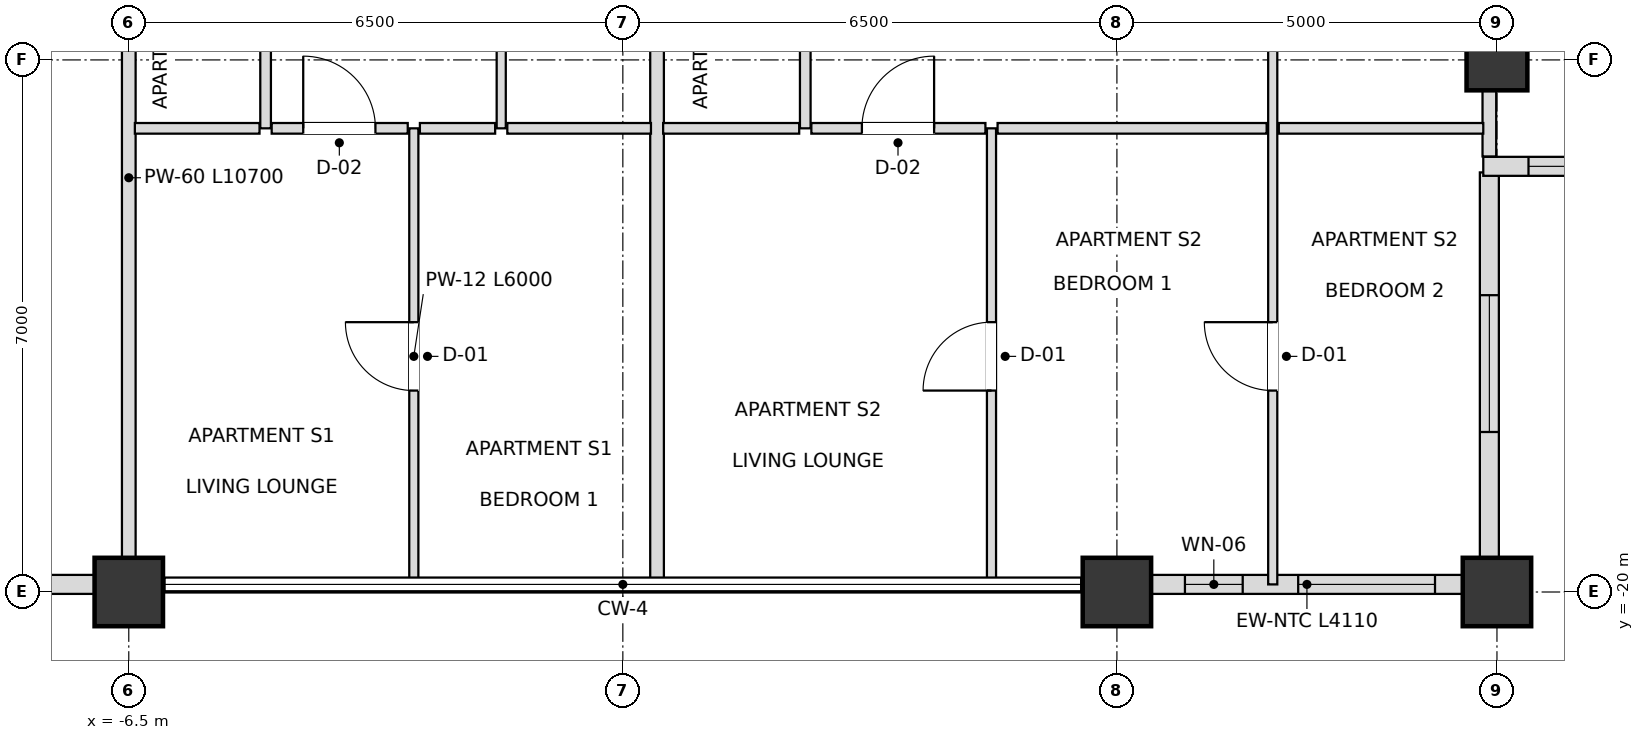
"""IFC4 building model, lengths in metres.
Left out: names, types, materials, properties, quantities, classifications, styles, units other than length and angle.
Written with IfcOpenShell. Run it as: python <this file> out.ifc"""

import sys

from ifc_helpers import new_model, si_unit, direction, frame, frame_2d, origin, origin_2d, place, context, subcontext, project, spatial, rectangle, extrude, element, fill, save


model = new_model("IFC4")
c1 = context("Model", 3, precision=1e-05, world=origin(), true_north=direction((0.0, 1.0)))
c2 = subcontext(c1, "Body", "Model", "MODEL_VIEW")
j1 = project(units=[si_unit("LENGTHUNIT", "METRE"), si_unit("PLANEANGLEUNIT", "RADIAN")], contexts=[c1])
p1 = place(None, origin())
s1 = spatial("IfcSite", under=j1, at=p1, CompositionType="ELEMENT")
p2 = place(p1, origin())
s2 = spatial("IfcBuilding", under=s1, at=p2, CompositionType="ELEMENT")
p3 = place(p2, frame((0.0, 0.0, 225.9)))
s3 = spatial("IfcBuildingStorey", under=s2, at=p3, CompositionType="ELEMENT", Elevation=225.9)
for number, where, z_axis, x_axis in (
    (1, (-6.5, -20.0, 0.0), (0.0, 0.0, 1.0), (1.0, 0.0, 0.0)),
    (2, (6.5, -20.0, 0.0), (0.0, 0.0, 1.0), (1.0, 0.0, 0.0)),
    (3, (11.5, -20.0, 0.0), (0.0, 0.0, 1.0), (1.0, 0.0, 0.0)),
):
    element("IfcColumn", number, at=place(p3, frame(where, z_axis=z_axis, x_axis=x_axis)), inside=s3, PredefinedType="USERDEFINED", context=c2, shape_type="SweptSolid", body=[
        extrude(rectangle(XDim=0.9, YDim=0.9, at=origin_2d()), origin(), (0.0, 0.0, 1.0), 3.6),
    ])
p4 = place(p3, frame((11.5, -13.0, 0.0), z_axis=(0.0, 0.0, 1.0), x_axis=(1.0, 0.0, 0.0)))
e4 = element("IfcColumn", 4, at=p4, inside=s3, PredefinedType="COLUMN", context=c2, shape_type="SweptSolid", body=[
    extrude(rectangle(XDim=0.8, YDim=0.8, at=origin_2d()), origin(), (0.0, 0.0, 1.0), 3.6),
])
p5 = place(p3, frame((-11.055, -19.9, 0.0), z_axis=(0.0, 0.0, 1.0), x_axis=(1.0, 0.0, 0.0)))
e5 = element("IfcWall", 5, at=p5, inside=s3, PredefinedType="SOLIDWALL", context=c2, shape_type="SweptSolid", body=[
    extrude(rectangle(XDim=4.11, YDim=0.25, at=frame_2d((2.055, 0.0))), origin(), (0.0, 0.0, 1.0), 2.748),
])
p6 = place(p5, frame((1.155, 0.0, 0.72)))
e6 = element("IfcOpeningElement", 6, at=p6, cuts=e5, PredefinedType="OPENING", context=c2, shape_type="SweptSolid", body=[
    extrude(rectangle(XDim=1.8, YDim=1.68, at=frame_2d((0.9, 0.84))), frame((0.0, 0.135, 0.0), z_axis=(0.0, -1.0, 0.0), x_axis=(1.0, 0.0, 0.0)), (0.0, 0.0, 1.0), 0.27),
])
p7 = place(p3, frame((6.945, -19.9, 0.0), z_axis=(0.0, 0.0, 1.0), x_axis=(1.0, 0.0, 0.0)))
e7 = element("IfcWall", 7, at=p7, inside=s3, PredefinedType="SOLIDWALL", context=c2, shape_type="SweptSolid", body=[
    extrude(rectangle(XDim=4.11, YDim=0.25, at=frame_2d((2.055, 0.0))), origin(), (0.0, 0.0, 1.0), 2.748),
])
p8 = place(p7, frame((0.45, 0.0, 0.72)))
e8 = element("IfcOpeningElement", 8, at=p8, cuts=e7, PredefinedType="OPENING", context=c2, shape_type="SweptSolid", body=[
    extrude(rectangle(XDim=0.76, YDim=1.68, at=frame_2d((0.38, 0.84))), frame((0.0, 0.135, 0.0), z_axis=(0.0, -1.0, 0.0), x_axis=(1.0, 0.0, 0.0)), (0.0, 0.0, 1.0), 0.27),
])
p9 = place(p7, frame((1.94, 0.0, 0.72)))
e9 = element("IfcOpeningElement", 9, at=p9, cuts=e7, PredefinedType="OPENING", context=c2, shape_type="SweptSolid", body=[
    extrude(rectangle(XDim=1.8, YDim=1.68, at=frame_2d((0.9, 0.84))), frame((0.0, 0.135, 0.0), z_axis=(0.0, -1.0, 0.0), x_axis=(1.0, 0.0, 0.0)), (0.0, 0.0, 1.0), 0.27),
])
p10 = place(p3, frame((11.4, -19.82, 0.0), z_axis=(0.0, 0.0, 1.0), x_axis=(0.0, 1.0, 0.0)))
e10 = element("IfcWall", 10, at=p10, inside=s3, PredefinedType="SOLIDWALL", context=c2, shape_type="SweptSolid", body=[
    extrude(rectangle(XDim=5.34, YDim=0.25, at=frame_2d((2.67, 0.0))), origin(), (0.0, 0.0, 1.0), 2.748),
])
p11 = place(p10, frame((1.925, 0.0, 0.72)))
e11 = element("IfcOpeningElement", 11, at=p11, cuts=e10, PredefinedType="OPENING", context=c2, shape_type="SweptSolid", body=[
    extrude(rectangle(XDim=1.8, YDim=1.68, at=frame_2d((0.9, 0.84))), frame((0.0, 0.135, 0.0), z_axis=(0.0, -1.0, 0.0), x_axis=(1.0, 0.0, 0.0)), (0.0, 0.0, 1.0), 0.27),
])
p12 = place(p3, frame((11.32, -14.4, 0.0), z_axis=(0.0, 0.0, 1.0), x_axis=(1.0, 0.0, 0.0)))
e12 = element("IfcWall", 12, at=p12, inside=s3, PredefinedType="SOLIDWALL", context=c2, shape_type="SweptSolid", body=[
    extrude(rectangle(XDim=5.66, YDim=0.25, at=frame_2d((2.83, 0.0))), origin(), (0.0, 0.0, 1.0), 2.748),
])
p13 = place(p12, frame((0.595, 0.0, 0.72)))
e13 = element("IfcOpeningElement", 13, at=p13, cuts=e12, PredefinedType="OPENING", context=c2, shape_type="SweptSolid", body=[
    extrude(rectangle(XDim=1.8, YDim=1.68, at=frame_2d((0.9, 0.84))), frame((0.0, 0.135, 0.0), z_axis=(0.0, -1.0, 0.0), x_axis=(1.0, 0.0, 0.0)), (0.0, 0.0, 1.0), 0.27),
])
p14 = place(p12, frame((3.265, 0.0, 0.72)))
e14 = element("IfcOpeningElement", 14, at=p14, cuts=e12, PredefinedType="OPENING", context=c2, shape_type="SweptSolid", body=[
    extrude(rectangle(XDim=1.8, YDim=1.68, at=frame_2d((0.9, 0.84))), frame((0.0, 0.135, 0.0), z_axis=(0.0, -1.0, 0.0), x_axis=(1.0, 0.0, 0.0)), (0.0, 0.0, 1.0), 0.27),
])
p15 = place(p3, frame((-6.5, -19.9, 0.0), z_axis=(0.0, 0.0, 1.0), x_axis=(0.0, 1.0, 0.0)))
e15 = element("IfcWall", 15, at=p15, inside=s3, PredefinedType="PARTITIONING", context=c2, shape_type="SweptSolid", body=[
    extrude(rectangle(XDim=10.7, YDim=0.18, at=frame_2d((5.35, 0.0))), origin(), (0.0, 0.0, 1.0), 2.826),
])
p16 = place(p3, frame((-4.7, -13.9, 0.0), z_axis=(0.0, 0.0, 1.0), x_axis=(0.0, 1.0, 0.0)))
e16 = element("IfcWall", 16, at=p16, inside=s3, PredefinedType="PARTITIONING", context=c2, shape_type="SweptSolid", body=[
    extrude(rectangle(XDim=4.7, YDim=0.14, at=frame_2d((2.35, 0.0))), origin(), (0.0, 0.0, 1.0), 3.38),
])
p17 = place(p16, frame((1.9, 0.0, 0.0)))
e17 = element("IfcOpeningElement", 17, at=p17, cuts=e16, PredefinedType="OPENING", context=c2, shape_type="SweptSolid", body=[
    extrude(rectangle(XDim=0.9, YDim=2.1, at=frame_2d((0.45, 1.05))), frame((0.0, 0.08, 0.0), z_axis=(0.0, -1.0, 0.0), x_axis=(1.0, 0.0, 0.0)), (0.0, 0.0, 1.0), 0.16),
])
p18 = place(p3, frame((-2.75, -19.9, 0.0), z_axis=(0.0, 0.0, 1.0), x_axis=(0.0, 1.0, 0.0)))
e18 = element("IfcWall", 18, at=p18, inside=s3, PredefinedType="PARTITIONING", context=c2, shape_type="SweptSolid", body=[
    extrude(rectangle(XDim=6.0, YDim=0.12, at=frame_2d((3.0, 0.0))), origin(), (0.0, 0.0, 1.0), 3.018),
])
p19 = place(p18, frame((2.55, 0.0, 0.0)))
e19 = element("IfcOpeningElement", 19, at=p19, cuts=e18, PredefinedType="OPENING", context=c2, shape_type="SweptSolid", body=[
    extrude(rectangle(XDim=0.9, YDim=2.1, at=frame_2d((0.45, 1.05))), frame((0.0, 0.07, 0.0), z_axis=(0.0, -1.0, 0.0), x_axis=(1.0, 0.0, 0.0)), (0.0, 0.0, 1.0), 0.14),
])
p20 = place(p3, frame((-1.6, -13.9, 0.0), z_axis=(0.0, 0.0, 1.0), x_axis=(0.0, 1.0, 0.0)))
e20 = element("IfcWall", 20, at=p20, inside=s3, PredefinedType="PARTITIONING", context=c2, shape_type="SweptSolid", body=[
    extrude(rectangle(XDim=4.7, YDim=0.12, at=frame_2d((2.35, 0.0))), origin(), (0.0, 0.0, 1.0), 3.38),
])
p21 = place(p20, frame((1.875, 0.0, 0.0)))
e21 = element("IfcOpeningElement", 21, at=p21, cuts=e20, PredefinedType="OPENING", context=c2, shape_type="SweptSolid", body=[
    extrude(rectangle(XDim=0.95, YDim=2.1, at=frame_2d((0.475, 1.05))), frame((0.0, 0.07, 0.0), z_axis=(0.0, -1.0, 0.0), x_axis=(1.0, 0.0, 0.0)), (0.0, 0.0, 1.0), 0.14),
])
p22 = place(p3, frame((0.45, -19.9, 0.0), z_axis=(0.0, 0.0, 1.0), x_axis=(0.0, 1.0, 0.0)))
e22 = element("IfcWall", 22, at=p22, inside=s3, PredefinedType="PARTITIONING", context=c2, shape_type="SweptSolid", body=[
    extrude(rectangle(XDim=10.7, YDim=0.18, at=frame_2d((5.35, 0.0))), origin(), (0.0, 0.0, 1.0), 3.018),
])
p23 = place(p3, frame((2.4, -13.9, 0.0), z_axis=(0.0, 0.0, 1.0), x_axis=(0.0, 1.0, 0.0)))
e23 = element("IfcWall", 23, at=p23, inside=s3, PredefinedType="PARTITIONING", context=c2, shape_type="SweptSolid", body=[
    extrude(rectangle(XDim=4.7, YDim=0.14, at=frame_2d((2.35, 0.0))), origin(), (0.0, 0.0, 1.0), 3.38),
])
p24 = place(p23, frame((1.9, 0.0, 0.0)))
e24 = element("IfcOpeningElement", 24, at=p24, cuts=e23, PredefinedType="OPENING", context=c2, shape_type="SweptSolid", body=[
    extrude(rectangle(XDim=0.9, YDim=2.1, at=frame_2d((0.45, 1.05))), frame((0.0, 0.08, 0.0), z_axis=(0.0, -1.0, 0.0), x_axis=(1.0, 0.0, 0.0)), (0.0, 0.0, 1.0), 0.16),
])
p25 = place(p3, frame((4.85, -19.9, 0.0), z_axis=(0.0, 0.0, 1.0), x_axis=(0.0, 1.0, 0.0)))
e25 = element("IfcWall", 25, at=p25, inside=s3, PredefinedType="PARTITIONING", context=c2, shape_type="SweptSolid", body=[
    extrude(rectangle(XDim=6.0, YDim=0.12, at=frame_2d((3.0, 0.0))), origin(), (0.0, 0.0, 1.0), 3.018),
])
p26 = place(p25, frame((2.55, 0.0, 0.0)))
e26 = element("IfcOpeningElement", 26, at=p26, cuts=e25, PredefinedType="OPENING", context=c2, shape_type="SweptSolid", body=[
    extrude(rectangle(XDim=0.9, YDim=2.1, at=frame_2d((0.45, 1.05))), frame((0.0, 0.07, 0.0), z_axis=(0.0, -1.0, 0.0), x_axis=(1.0, 0.0, 0.0)), (0.0, 0.0, 1.0), 0.14),
])
p27 = place(p3, frame((8.55, -19.9, 0.0), z_axis=(0.0, 0.0, 1.0), x_axis=(0.0, 1.0, 0.0)))
e27 = element("IfcWall", 27, at=p27, inside=s3, PredefinedType="PARTITIONING", context=c2, shape_type="SweptSolid", body=[
    extrude(rectangle(XDim=10.7, YDim=0.12, at=frame_2d((5.35, 0.0))), origin(), (0.0, 0.0, 1.0), 2.826),
])
p28 = place(p27, frame((7.875, 0.0, 0.0)))
e28 = element("IfcOpeningElement", 28, at=p28, cuts=e27, PredefinedType="OPENING", context=c2, shape_type="SweptSolid", body=[
    extrude(rectangle(XDim=0.95, YDim=2.1, at=frame_2d((0.475, 1.05))), frame((0.0, 0.07, 0.0), z_axis=(0.0, -1.0, 0.0), x_axis=(1.0, 0.0, 0.0)), (0.0, 0.0, 1.0), 0.14),
])
p29 = place(p27, frame((2.55, 0.0, 0.0)))
e29 = element("IfcOpeningElement", 29, at=p29, cuts=e27, PredefinedType="OPENING", context=c2, shape_type="SweptSolid", body=[
    extrude(rectangle(XDim=0.9, YDim=2.1, at=frame_2d((0.45, 1.05))), frame((0.0, 0.07, 0.0), z_axis=(0.0, -1.0, 0.0), x_axis=(1.0, 0.0, 0.0)), (0.0, 0.0, 1.0), 0.14),
])
p30 = place(p3, frame((11.4, -14.27, 0.0), z_axis=(0.0, 0.0, 1.0), x_axis=(0.0, 1.0, 0.0)))
e30 = element("IfcWall", 30, at=p30, inside=s3, PredefinedType="PARTITIONING", context=c2, shape_type="SweptSolid", body=[
    extrude(rectangle(XDim=5.07, YDim=0.18, at=frame_2d((2.535, 0.0))), origin(), (0.0, 0.0, 1.0), 2.748),
])
p31 = place(p3, frame((-6.42, -13.9, 0.0), z_axis=(0.0, 0.0, 1.0), x_axis=(1.0, 0.0, 0.0)))
e31 = element("IfcWall", 31, at=p31, inside=s3, PredefinedType="PARTITIONING", context=c2, shape_type="SweptSolid", body=[
    extrude(rectangle(XDim=1.64, YDim=0.14, at=frame_2d((0.82, 0.0))), origin(), (0.0, 0.0, 1.0), 3.38),
])
p32 = place(p3, frame((-4.62, -13.9, 0.0), z_axis=(0.0, 0.0, 1.0), x_axis=(1.0, 0.0, 0.0)))
e32 = element("IfcWall", 32, at=p32, inside=s3, PredefinedType="PARTITIONING", context=c2, shape_type="SweptSolid", body=[
    extrude(rectangle(XDim=1.79, YDim=0.14, at=frame_2d((0.895, 0.0))), origin(), (0.0, 0.0, 1.0), 3.38),
])
p33 = place(p32, frame((0.415, 0.0, 0.0)))
e33 = element("IfcOpeningElement", 33, at=p33, cuts=e32, PredefinedType="OPENING", context=c2, shape_type="SweptSolid", body=[
    extrude(rectangle(XDim=0.95, YDim=2.1, at=frame_2d((0.475, 1.05))), frame((0.0, 0.08, 0.0), z_axis=(0.0, -1.0, 0.0), x_axis=(1.0, 0.0, 0.0)), (0.0, 0.0, 1.0), 0.16),
])
p34 = place(p3, frame((-2.67, -13.9, 0.0), z_axis=(0.0, 0.0, 1.0), x_axis=(1.0, 0.0, 0.0)))
e34 = element("IfcWall", 34, at=p34, inside=s3, PredefinedType="PARTITIONING", context=c2, shape_type="SweptSolid", body=[
    extrude(rectangle(XDim=0.99, YDim=0.14, at=frame_2d((0.495, 0.0))), origin(), (0.0, 0.0, 1.0), 3.38),
])
p35 = place(p3, frame((-1.52, -13.9, 0.0), z_axis=(0.0, 0.0, 1.0), x_axis=(1.0, 0.0, 0.0)))
e35 = element("IfcWall", 35, at=p35, inside=s3, PredefinedType="PARTITIONING", context=c2, shape_type="SweptSolid", body=[
    extrude(rectangle(XDim=1.89, YDim=0.14, at=frame_2d((0.945, 0.0))), origin(), (0.0, 0.0, 1.0), 3.38),
])
p36 = place(p3, frame((0.53, -13.9, 0.0), z_axis=(0.0, 0.0, 1.0), x_axis=(1.0, 0.0, 0.0)))
e36 = element("IfcWall", 36, at=p36, inside=s3, PredefinedType="PARTITIONING", context=c2, shape_type="SweptSolid", body=[
    extrude(rectangle(XDim=1.79, YDim=0.14, at=frame_2d((0.895, 0.0))), origin(), (0.0, 0.0, 1.0), 3.38),
])
p37 = place(p3, frame((2.48, -13.9, 0.0), z_axis=(0.0, 0.0, 1.0), x_axis=(1.0, 0.0, 0.0)))
e37 = element("IfcWall", 37, at=p37, inside=s3, PredefinedType="PARTITIONING", context=c2, shape_type="SweptSolid", body=[
    extrude(rectangle(XDim=2.29, YDim=0.14, at=frame_2d((1.145, 0.0))), origin(), (0.0, 0.0, 1.0), 3.38),
])
p38 = place(p37, frame((0.665, 0.0, 0.0)))
e38 = element("IfcOpeningElement", 38, at=p38, cuts=e37, PredefinedType="OPENING", context=c2, shape_type="SweptSolid", body=[
    extrude(rectangle(XDim=0.95, YDim=2.1, at=frame_2d((0.475, 1.05))), frame((0.0, 0.08, 0.0), z_axis=(0.0, -1.0, 0.0), x_axis=(1.0, 0.0, 0.0)), (0.0, 0.0, 1.0), 0.16),
])
p39 = place(p3, frame((4.93, -13.9, 0.0), z_axis=(0.0, 0.0, 1.0), x_axis=(1.0, 0.0, 0.0)))
e39 = element("IfcWall", 39, at=p39, inside=s3, PredefinedType="PARTITIONING", context=c2, shape_type="SweptSolid", body=[
    extrude(rectangle(XDim=3.54, YDim=0.14, at=frame_2d((1.77, 0.0))), origin(), (0.0, 0.0, 1.0), 2.826),
])
p40 = place(p3, frame((8.63, -13.9, 0.0), z_axis=(0.0, 0.0, 1.0), x_axis=(1.0, 0.0, 0.0)))
e40 = element("IfcWall", 40, at=p40, inside=s3, PredefinedType="PARTITIONING", context=c2, shape_type="SweptSolid", body=[
    extrude(rectangle(XDim=2.69, YDim=0.14, at=frame_2d((1.345, 0.0))), origin(), (0.0, 0.0, 1.0), 3.38),
])
p41 = place(p8, origin())
e41 = element("IfcWindow", 41, at=p41, inside=s3, PartitioningType="SINGLE_PANEL", PredefinedType="WINDOW", context=c2, shape_type="SweptSolid", body=[
    extrude(rectangle(XDim=0.76, YDim=1.68, at=frame_2d((0.38, 0.84))), frame((0.0, 0.03, 0.0), z_axis=(0.0, -1.0, 0.0), x_axis=(1.0, 0.0, 0.0)), (0.0, 0.0, 1.0), 0.06),
])
fill(e8, e41)
p42 = place(p9, origin())
e42 = element("IfcWindow", 42, at=p42, inside=s3, PartitioningType="SINGLE_PANEL", PredefinedType="WINDOW", context=c2, shape_type="SweptSolid", body=[
    extrude(rectangle(XDim=1.8, YDim=1.68, at=frame_2d((0.9, 0.84))), frame((0.0, 0.03, 0.0), z_axis=(0.0, -1.0, 0.0), x_axis=(1.0, 0.0, 0.0)), (0.0, 0.0, 1.0), 0.06),
])
fill(e9, e42)
p43 = place(p11, origin())
e43 = element("IfcWindow", 43, at=p43, inside=s3, PartitioningType="SINGLE_PANEL", PredefinedType="WINDOW", context=c2, shape_type="SweptSolid", body=[
    extrude(rectangle(XDim=1.8, YDim=1.68, at=frame_2d((0.9, 0.84))), frame((0.0, 0.03, 0.0), z_axis=(0.0, -1.0, 0.0), x_axis=(1.0, 0.0, 0.0)), (0.0, 0.0, 1.0), 0.06),
])
fill(e11, e43)
p44 = place(p13, origin())
e44 = element("IfcWindow", 44, at=p44, inside=s3, PartitioningType="SINGLE_PANEL", PredefinedType="WINDOW", context=c2, shape_type="SweptSolid", body=[
    extrude(rectangle(XDim=1.8, YDim=1.68, at=frame_2d((0.9, 0.84))), frame((0.0, 0.03, 0.0), z_axis=(0.0, -1.0, 0.0), x_axis=(1.0, 0.0, 0.0)), (0.0, 0.0, 1.0), 0.06),
])
fill(e13, e44)
p45 = place(p33, origin())
e45 = element("IfcDoor", 45, at=p45, inside=s3, OperationType="SINGLE_SWING_LEFT", PredefinedType="DOOR", context=c2, shape_type="SweptSolid", body=[
    extrude(rectangle(XDim=0.95, YDim=2.1, at=frame_2d((0.475, 1.05))), frame((0.0, 0.025, 0.0), z_axis=(0.0, -1.0, 0.0), x_axis=(1.0, 0.0, 0.0)), (0.0, 0.0, 1.0), 0.05),
])
fill(e33, e45)
p46 = place(p19, origin())
e46 = element("IfcDoor", 46, at=p46, inside=s3, OperationType="SINGLE_SWING_RIGHT", PredefinedType="DOOR", context=c2, shape_type="SweptSolid", body=[
    extrude(rectangle(XDim=0.9, YDim=2.1, at=frame_2d((0.45, 1.05))), frame((0.0, 0.025, 0.0), z_axis=(0.0, -1.0, 0.0), x_axis=(1.0, 0.0, 0.0)), (0.0, 0.0, 1.0), 0.05),
])
fill(e19, e46)
p47 = place(p38, origin())
e47 = element("IfcDoor", 47, at=p47, inside=s3, OperationType="SINGLE_SWING_RIGHT", PredefinedType="DOOR", context=c2, shape_type="SweptSolid", body=[
    extrude(rectangle(XDim=0.95, YDim=2.1, at=frame_2d((0.475, 1.05))), frame((0.0, 0.025, 0.0), z_axis=(0.0, -1.0, 0.0), x_axis=(1.0, 0.0, 0.0)), (0.0, 0.0, 1.0), 0.05),
])
fill(e38, e47)
p48 = place(p26, origin())
e48 = element("IfcDoor", 48, at=p48, inside=s3, OperationType="SINGLE_SWING_LEFT", PredefinedType="DOOR", context=c2, shape_type="SweptSolid", body=[
    extrude(rectangle(XDim=0.9, YDim=2.1, at=frame_2d((0.45, 1.05))), frame((0.0, 0.025, 0.0), z_axis=(0.0, -1.0, 0.0), x_axis=(1.0, 0.0, 0.0)), (0.0, 0.0, 1.0), 0.05),
])
fill(e26, e48)
p49 = place(p29, origin())
e49 = element("IfcDoor", 49, at=p49, inside=s3, OperationType="SINGLE_SWING_RIGHT", PredefinedType="DOOR", context=c2, shape_type="SweptSolid", body=[
    extrude(rectangle(XDim=0.9, YDim=2.1, at=frame_2d((0.45, 1.05))), frame((0.0, 0.025, 0.0), z_axis=(0.0, -1.0, 0.0), x_axis=(1.0, 0.0, 0.0)), (0.0, 0.0, 1.0), 0.05),
])
fill(e29, e49)
save(model, sys.argv[1])
